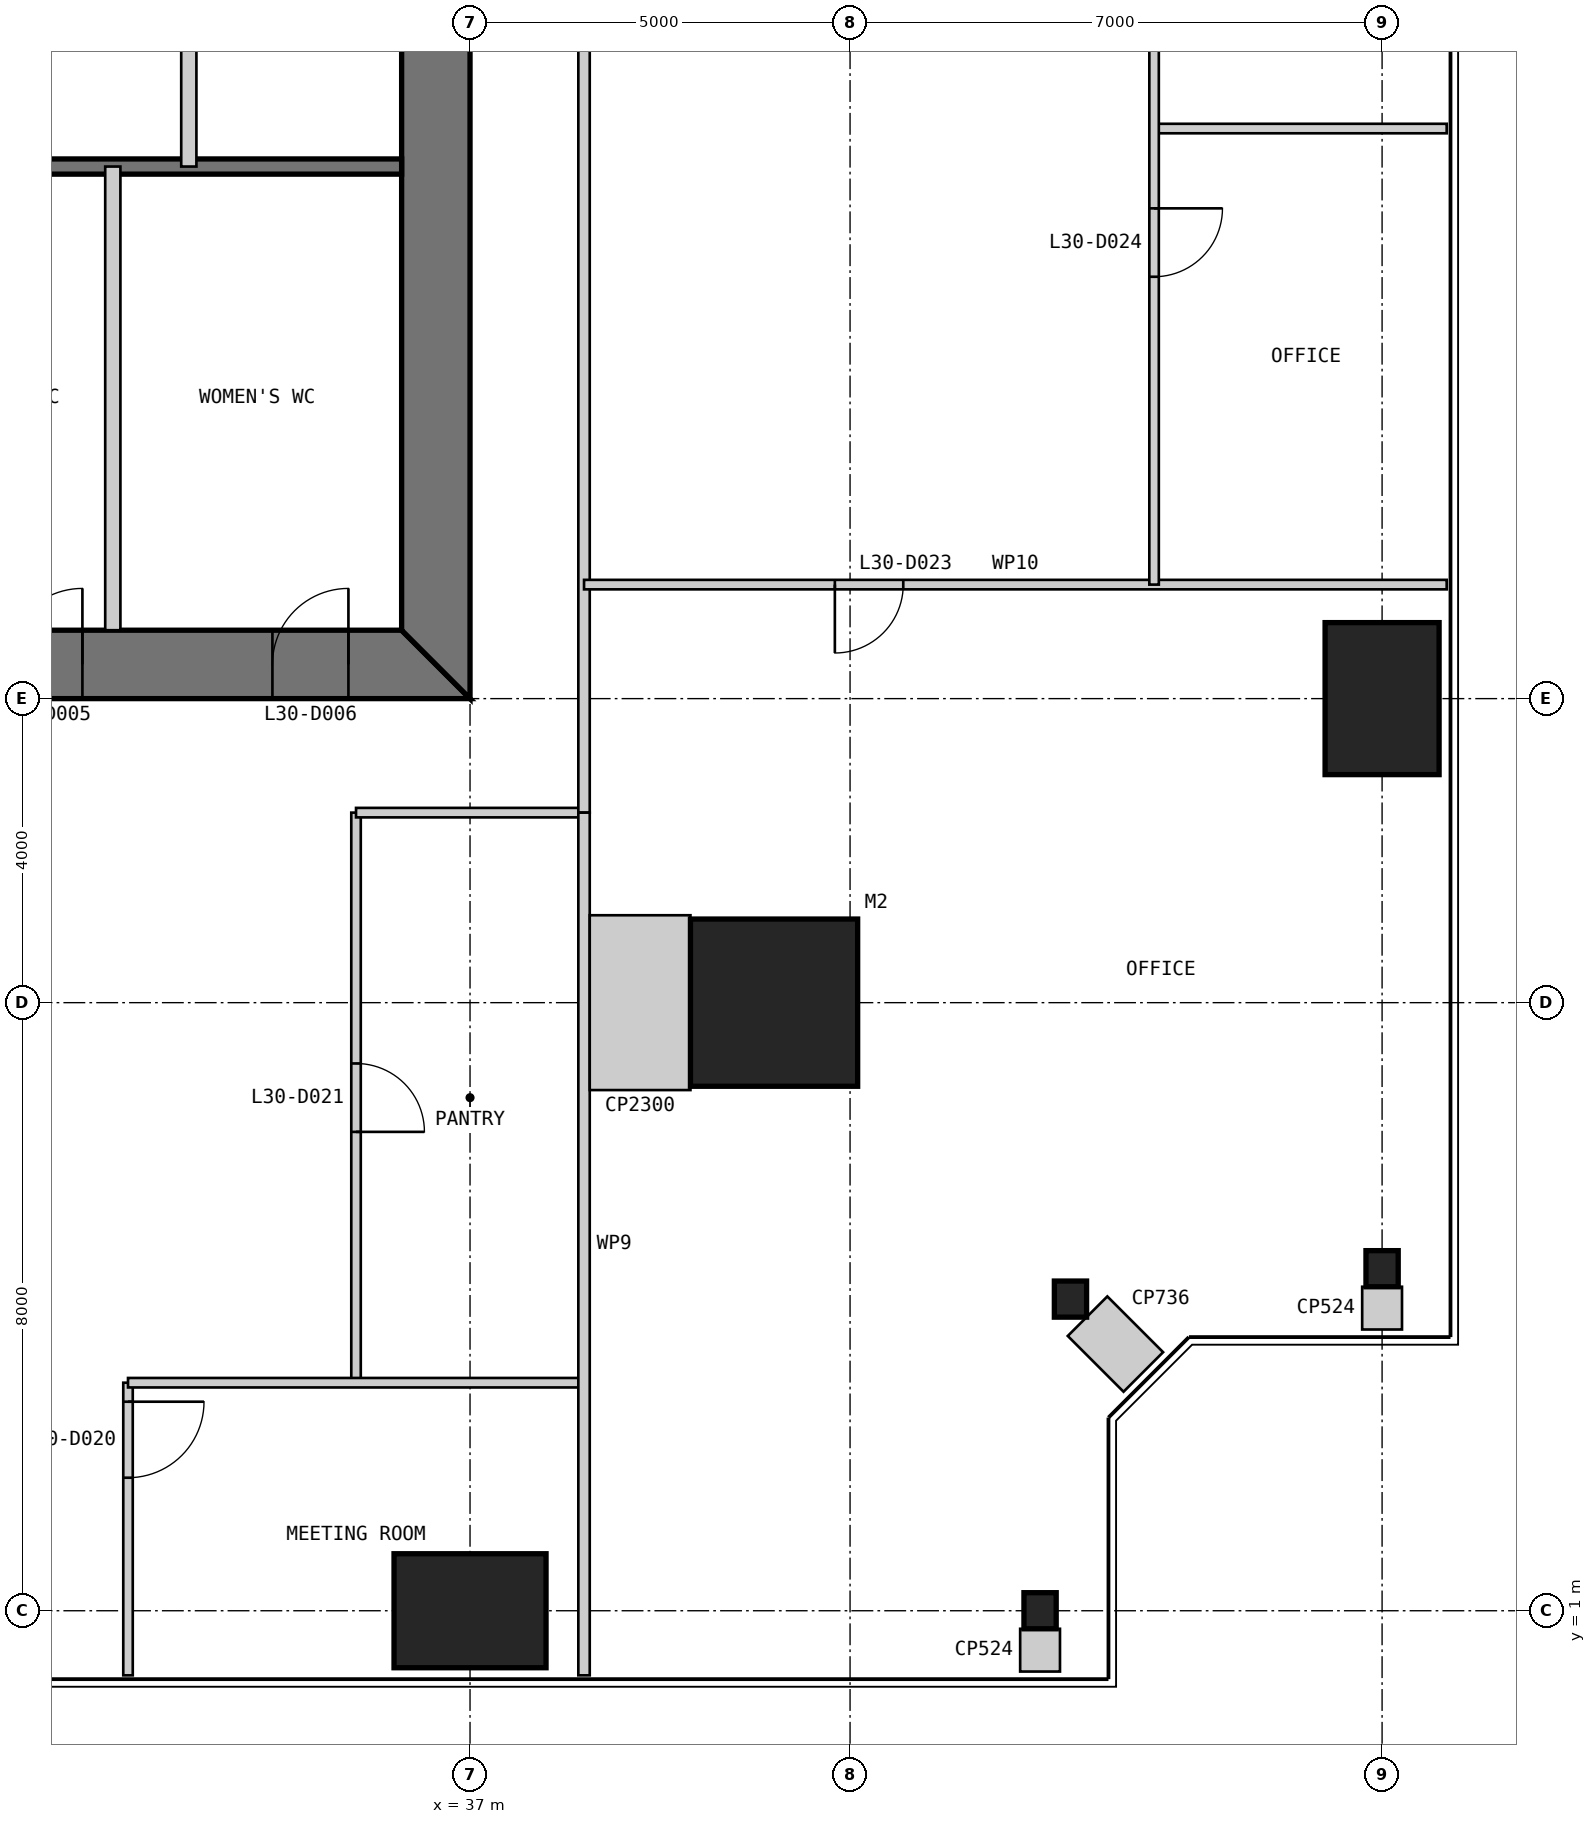
"""IFC4 building model, lengths in metres.
Left out: names, types, materials, properties, quantities, classifications, styles, units other than length and angle.
Written with IfcOpenShell. Run it as: python <this file> out.ifc"""

import sys

from ifc_helpers import new_model, si_unit, direction, frame, frame_2d, origin, origin_2d, place, context, subcontext, project, spatial, polyline, rectangle, i_section, outline, extrude, element, fill, save


model = new_model("IFC4")
c1 = context("Model", 3, precision=1e-05, world=origin(), true_north=direction((0.0, 1.0)))
c2 = subcontext(c1, "Body", "Model", "MODEL_VIEW")
j1 = project(units=[si_unit("LENGTHUNIT", "METRE"), si_unit("PLANEANGLEUNIT", "RADIAN")], contexts=[c1])
p1 = place(None, origin())
s1 = spatial("IfcSite", under=j1, at=p1, CompositionType="ELEMENT")
p2 = place(p1, origin())
s2 = spatial("IfcBuilding", under=s1, at=p2, CompositionType="ELEMENT")
p3 = place(p2, frame((0.0, 0.0, 130.4)))
s3 = spatial("IfcBuildingStorey", under=s2, at=p3, CompositionType="ELEMENT", Elevation=130.4)
p4 = place(p3, frame((41.0, 9.0, 0.0), z_axis=(0.0, 0.0, 1.0), x_axis=(1.0, 0.0, 0.0)))
e1 = element("IfcColumn", 1, at=p4, inside=s3, PredefinedType="COLUMN", context=c2, shape_type="SweptSolid", body=[
    extrude(rectangle(XDim=2.2, YDim=2.2, at=origin_2d()), origin(), (0.0, 0.0, 1.0), 4.0),
])
p5 = place(p3, frame((37.0, 1.0, 0.0), z_axis=(0.0, 0.0, 1.0), x_axis=(1.0, 0.0, 0.0)))
e2 = element("IfcColumn", 2, at=p5, inside=s3, PredefinedType="COLUMN", context=c2, shape_type="SweptSolid", body=[
    extrude(rectangle(XDim=2.0, YDim=1.5, at=origin_2d()), origin(), (0.0, 0.0, 1.0), 4.0),
])
for number, where, z_axis, x_axis in (
    (3, (44.5, 1.0, 0.0), (0.0, 0.0, 1.0), (1.0, 0.0, 0.0)),
    (4, (44.9, 5.1, 0.0), (0.0, 0.0, 1.0), (1.0, 0.0, 0.0)),
    (5, (49.0, 5.5, 0.0), (0.0, 0.0, 1.0), (1.0, 0.0, 0.0)),
):
    element("IfcColumn", number, at=place(p3, frame(where, z_axis=z_axis, x_axis=x_axis)), inside=s3, PredefinedType="COLUMN", context=c2, shape_type="SweptSolid", body=[
        extrude(i_section(OverallWidth=0.424, OverallDepth=0.475, WebThickness=0.048, FlangeThickness=0.077, at=origin_2d()), origin(), (0.0, 0.0, 1.0), 4.0),
    ])
p6 = place(p3, frame((49.0, 13.0, 0.0), z_axis=(0.0, 0.0, 1.0), x_axis=(1.0, 0.0, 0.0)))
e6 = element("IfcColumn", 6, at=p6, inside=s3, PredefinedType="COLUMN", context=c2, shape_type="SweptSolid", body=[
    extrude(rectangle(XDim=1.5, YDim=2.0, at=origin_2d()), origin(), (0.0, 0.0, 1.0), 4.0),
])
p7 = place(p3, frame((13.0, 13.45, 0.0), z_axis=(0.0, 0.0, 1.0), x_axis=(1.0, 0.0, 0.0)))
e7 = element("IfcWall", 7, at=p7, inside=s3, PredefinedType="SHEAR", context=c2, shape_type="SweptSolid", body=[
    extrude(outline(polyline([(0.0, -0.45), (24.0, -0.45), (23.1, 0.45), (0.9, 0.45), (0.0, -0.45)])), origin(), (0.0, 0.0, 1.0), 4.0),
])
p8 = place(p7, frame((4.9, 0.0, 0.0)))
e8 = element("IfcOpeningElement", 8, at=p8, cuts=e7, PredefinedType="OPENING", context=c2, shape_type="SweptSolid", body=[
    extrude(rectangle(XDim=1.0, YDim=2.2, at=frame_2d((0.5, 1.1))), frame((0.0, 0.46, 0.0), z_axis=(0.0, -1.0, 0.0), x_axis=(1.0, 0.0, 0.0)), (0.0, 0.0, 1.0), 0.92),
])
p9 = place(p7, frame((8.9, 0.0, 0.0)))
e9 = element("IfcOpeningElement", 9, at=p9, cuts=e7, PredefinedType="OPENING", context=c2, shape_type="SweptSolid", body=[
    extrude(rectangle(XDim=1.1, YDim=2.2, at=frame_2d((0.55, 1.1))), frame((0.0, 0.46, 0.0), z_axis=(0.0, -1.0, 0.0), x_axis=(1.0, 0.0, 0.0)), (0.0, 0.0, 1.0), 0.92),
])
p10 = place(p7, frame((15.05, 0.0, 0.0)))
e10 = element("IfcOpeningElement", 10, at=p10, cuts=e7, PredefinedType="OPENING", context=c2, shape_type="SweptSolid", body=[
    extrude(rectangle(XDim=0.9, YDim=2.2, at=frame_2d((0.45, 1.1))), frame((0.0, 0.46, 0.0), z_axis=(0.0, -1.0, 0.0), x_axis=(1.0, 0.0, 0.0)), (0.0, 0.0, 1.0), 0.92),
])
p11 = place(p7, frame((17.9, 0.0, 0.0)))
e11 = element("IfcOpeningElement", 11, at=p11, cuts=e7, PredefinedType="OPENING", context=c2, shape_type="SweptSolid", body=[
    extrude(rectangle(XDim=1.0, YDim=2.2, at=frame_2d((0.5, 1.1))), frame((0.0, 0.46, 0.0), z_axis=(0.0, -1.0, 0.0), x_axis=(1.0, 0.0, 0.0)), (0.0, 0.0, 1.0), 0.92),
])
p12 = place(p7, frame((21.4, 0.0, 0.0)))
e12 = element("IfcOpeningElement", 12, at=p12, cuts=e7, PredefinedType="OPENING", context=c2, shape_type="SweptSolid", body=[
    extrude(rectangle(XDim=1.0, YDim=2.2, at=frame_2d((0.5, 1.1))), frame((0.0, 0.46, 0.0), z_axis=(0.0, -1.0, 0.0), x_axis=(1.0, 0.0, 0.0)), (0.0, 0.0, 1.0), 0.92),
])
p13 = place(p3, frame((36.55, 13.9, 0.0), z_axis=(0.0, 0.0, 1.0), x_axis=(0.0, 1.0, 0.0)))
e13 = element("IfcWall", 13, at=p13, inside=s3, PredefinedType="SHEAR", context=c2, shape_type="SweptSolid", body=[
    extrude(outline(polyline([(-0.9, -0.45), (23.1, -0.45), (22.2, 0.45), (0.0, 0.45), (-0.9, -0.45)])), origin(), (0.0, 0.0, 1.0), 4.0),
])
p14 = place(p13, frame((20.2, 0.0, 0.0)))
e14 = element("IfcOpeningElement", 14, at=p14, cuts=e13, PredefinedType="OPENING", context=c2, shape_type="SweptSolid", body=[
    extrude(rectangle(XDim=1.0, YDim=2.2, at=frame_2d((0.5, 1.1))), frame((0.0, 0.46, 0.0), z_axis=(0.0, -1.0, 0.0), x_axis=(1.0, 0.0, 0.0)), (0.0, 0.0, 1.0), 0.92),
])
p15 = place(p13, frame((17.25, 0.0, 0.0)))
e15 = element("IfcOpeningElement", 15, at=p15, cuts=e13, PredefinedType="OPENING", context=c2, shape_type="SweptSolid", body=[
    extrude(rectangle(XDim=0.9, YDim=2.2, at=frame_2d((0.45, 1.1))), frame((0.0, 0.46, 0.0), z_axis=(0.0, -1.0, 0.0), x_axis=(1.0, 0.0, 0.0)), (0.0, 0.0, 1.0), 0.92),
])
p16 = place(p3, frame((20.3, 20.0, 0.0), z_axis=(0.0, 0.0, 1.0), x_axis=(1.0, 0.0, 0.0)))
e16 = element("IfcWall", 16, at=p16, inside=s3, PredefinedType="SOLIDWALL", context=c2, shape_type="SweptSolid", body=[
    extrude(rectangle(XDim=15.8, YDim=0.2, at=frame_2d((7.9, 0.0))), origin(), (0.0, 0.0, 1.0), 3.8),
])
p17 = place(p3, frame((32.3, 13.9, 0.0), z_axis=(0.0, 0.0, 1.0), x_axis=(0.0, 1.0, 0.0)))
e17 = element("IfcWall", 17, at=p17, inside=s3, PredefinedType="PARTITIONING", context=c2, shape_type="SweptSolid", body=[
    extrude(rectangle(XDim=6.1, YDim=0.2, at=frame_2d((3.05, 0.0))), origin(), (0.0, 0.0, 1.0), 3.8),
])
p18 = place(p3, frame((33.3, 36.1, 0.0), z_axis=(0.0, 0.0, 1.0), x_axis=(0.0, -1.0, 0.0)))
e18 = element("IfcWall", 18, at=p18, inside=s3, PredefinedType="PARTITIONING", context=c2, shape_type="SweptSolid", body=[
    extrude(rectangle(XDim=16.1, YDim=0.2, at=frame_2d((8.05, 0.0))), origin(), (0.0, 0.0, 1.0), 3.8),
])
p19 = place(p18, frame((3.8, 0.0, 0.0)))
e19 = element("IfcOpeningElement", 19, at=p19, cuts=e18, PredefinedType="OPENING", context=c2, shape_type="SweptSolid", body=[
    extrude(rectangle(XDim=0.9, YDim=2.2, at=frame_2d((0.45, 1.1))), frame((0.0, 0.11, 0.0), z_axis=(0.0, -1.0, 0.0), x_axis=(1.0, 0.0, 0.0)), (0.0, 0.0, 1.0), 0.22),
])
p20 = place(p3, frame((32.5, 0.15, 0.0), z_axis=(0.0, 0.0, 1.0), x_axis=(0.0, 1.0, 0.0)))
e20 = element("IfcWall", 20, at=p20, inside=s3, PredefinedType="PARTITIONING", context=c2, shape_type="SweptSolid", body=[
    extrude(rectangle(XDim=3.85, YDim=0.125, at=frame_2d((1.925, 0.0))), origin(), (0.0, 0.0, 1.0), 3.85),
])
p21 = place(p20, frame((2.6, 0.0, 0.0)))
e21 = element("IfcOpeningElement", 21, at=p21, cuts=e20, PredefinedType="OPENING", context=c2, shape_type="SweptSolid", body=[
    extrude(rectangle(XDim=1.0, YDim=2.2, at=frame_2d((0.5, 1.1))), frame((0.0, 0.073, 0.0), z_axis=(0.0, -1.0, 0.0), x_axis=(1.0, 0.0, 0.0)), (0.0, 0.0, 1.0), 0.145),
])
p22 = place(p3, frame((35.5, 4.0, 0.0), z_axis=(0.0, 0.0, 1.0), x_axis=(0.0, 1.0, 0.0)))
e22 = element("IfcWall", 22, at=p22, inside=s3, PredefinedType="PARTITIONING", context=c2, shape_type="SweptSolid", body=[
    extrude(rectangle(XDim=7.5, YDim=0.125, at=frame_2d((3.75, 0.0))), origin(), (0.0, 0.0, 1.0), 3.85),
])
p23 = place(p22, frame((3.3, 0.0, 0.0)))
e23 = element("IfcOpeningElement", 23, at=p23, cuts=e22, PredefinedType="OPENING", context=c2, shape_type="SweptSolid", body=[
    extrude(rectangle(XDim=0.9, YDim=2.2, at=frame_2d((0.45, 1.1))), frame((0.0, 0.073, 0.0), z_axis=(0.0, -1.0, 0.0), x_axis=(1.0, 0.0, 0.0)), (0.0, 0.0, 1.0), 0.145),
])
p24 = place(p3, frame((32.5, 4.0, 0.0), z_axis=(0.0, 0.0, 1.0), x_axis=(1.0, 0.0, 0.0)))
e24 = element("IfcWall", 24, at=p24, inside=s3, PredefinedType="PARTITIONING", context=c2, shape_type="SweptSolid", body=[
    extrude(rectangle(XDim=6.0, YDim=0.125, at=frame_2d((3.0, 0.0))), origin(), (0.0, 0.0, 1.0), 3.85),
])
p25 = place(p3, frame((35.5, 11.5, 0.0), z_axis=(0.0, 0.0, 1.0), x_axis=(1.0, 0.0, 0.0)))
e25 = element("IfcWall", 25, at=p25, inside=s3, PredefinedType="PARTITIONING", context=c2, shape_type="SweptSolid", body=[
    extrude(rectangle(XDim=3.0, YDim=0.125, at=frame_2d((1.5, 0.0))), origin(), (0.0, 0.0, 1.0), 3.85),
])
p26 = place(p3, frame((38.5, 11.5, 0.0), z_axis=(0.0, 0.0, 1.0), x_axis=(0.0, 1.0, 0.0)))
e26 = element("IfcWall", 26, at=p26, inside=s3, PredefinedType="PARTITIONING", context=c2, shape_type="SweptSolid", body=[
    extrude(rectangle(XDim=27.0, YDim=0.15, at=frame_2d((13.5, 0.0))), origin(), (0.0, 0.0, 1.0), 3.85),
])
p27 = place(p26, frame((13.0, 0.0, 0.0)))
e27 = element("IfcOpeningElement", 27, at=p27, cuts=e26, PredefinedType="OPENING", context=c2, shape_type="SweptSolid", body=[
    extrude(rectangle(XDim=1.0, YDim=2.2, at=frame_2d((0.5, 1.1))), frame((0.0, 0.085, 0.0), z_axis=(0.0, -1.0, 0.0), x_axis=(1.0, 0.0, 0.0)), (0.0, 0.0, 1.0), 0.17),
])
p28 = place(p3, frame((38.5, 0.15, 0.0), z_axis=(0.0, 0.0, 1.0), x_axis=(0.0, 1.0, 0.0)))
e28 = element("IfcWall", 28, at=p28, inside=s3, PredefinedType="PARTITIONING", context=c2, shape_type="SweptSolid", body=[
    extrude(rectangle(XDim=11.35, YDim=0.15, at=frame_2d((5.675, 0.0))), origin(), (0.0, 0.0, 1.0), 3.85),
])
p29 = place(p3, frame((49.85, 14.5, 0.0), z_axis=(0.0, 0.0, 1.0), x_axis=(-1.0, 0.0, 0.0)))
e29 = element("IfcWall", 29, at=p29, inside=s3, PredefinedType="PARTITIONING", context=c2, shape_type="SweptSolid", body=[
    extrude(rectangle(XDim=11.35, YDim=0.125, at=frame_2d((5.675, 0.0))), origin(), (0.0, 0.0, 1.0), 3.85),
])
p30 = place(p29, frame((7.15, 0.0, 0.0)))
e30 = element("IfcOpeningElement", 30, at=p30, cuts=e29, PredefinedType="OPENING", context=c2, shape_type="SweptSolid", body=[
    extrude(rectangle(XDim=0.9, YDim=2.2, at=frame_2d((0.45, 1.1))), frame((0.0, 0.073, 0.0), z_axis=(0.0, -1.0, 0.0), x_axis=(1.0, 0.0, 0.0)), (0.0, 0.0, 1.0), 0.145),
])
p31 = place(p3, frame((49.85, 20.5, 0.0), z_axis=(0.0, 0.0, 1.0), x_axis=(-1.0, 0.0, 0.0)))
e31 = element("IfcWall", 31, at=p31, inside=s3, PredefinedType="PARTITIONING", context=c2, shape_type="SweptSolid", body=[
    extrude(rectangle(XDim=3.85, YDim=0.125, at=frame_2d((1.925, 0.0))), origin(), (0.0, 0.0, 1.0), 3.85),
])
p32 = place(p3, frame((46.0, 14.5, 0.0), z_axis=(0.0, 0.0, 1.0), x_axis=(0.0, 1.0, 0.0)))
e32 = element("IfcWall", 32, at=p32, inside=s3, PredefinedType="PARTITIONING", context=c2, shape_type="SweptSolid", body=[
    extrude(rectangle(XDim=24.0, YDim=0.125, at=frame_2d((12.0, 0.0))), origin(), (0.0, 0.0, 1.0), 3.238),
])
p33 = place(p32, frame((4.05, 0.0, 0.0)))
e33 = element("IfcOpeningElement", 33, at=p33, cuts=e32, PredefinedType="OPENING", context=c2, shape_type="SweptSolid", body=[
    extrude(rectangle(XDim=0.9, YDim=2.2, at=frame_2d((0.45, 1.1))), frame((0.0, 0.073, 0.0), z_axis=(0.0, -1.0, 0.0), x_axis=(1.0, 0.0, 0.0)), (0.0, 0.0, 1.0), 0.145),
])
p34 = place(p32, frame((10.05, 0.0, 0.0)))
e34 = element("IfcOpeningElement", 34, at=p34, cuts=e32, PredefinedType="OPENING", context=c2, shape_type="SweptSolid", body=[
    extrude(rectangle(XDim=0.9, YDim=2.2, at=frame_2d((0.45, 1.1))), frame((0.0, 0.073, 0.0), z_axis=(0.0, -1.0, 0.0), x_axis=(1.0, 0.0, 0.0)), (0.0, 0.0, 1.0), 0.145),
])
p35 = place(p32, frame((16.05, 0.0, 0.0)))
e35 = element("IfcOpeningElement", 35, at=p35, cuts=e32, PredefinedType="OPENING", context=c2, shape_type="SweptSolid", body=[
    extrude(rectangle(XDim=0.9, YDim=2.2, at=frame_2d((0.45, 1.1))), frame((0.0, 0.073, 0.0), z_axis=(0.0, -1.0, 0.0), x_axis=(1.0, 0.0, 0.0)), (0.0, 0.0, 1.0), 0.145),
])
p36 = place(p32, frame((19.05, 0.0, 0.0)))
e36 = element("IfcOpeningElement", 36, at=p36, cuts=e32, PredefinedType="OPENING", context=c2, shape_type="SweptSolid", body=[
    extrude(rectangle(XDim=0.9, YDim=2.2, at=frame_2d((0.45, 1.1))), frame((0.0, 0.073, 0.0), z_axis=(0.0, -1.0, 0.0), x_axis=(1.0, 0.0, 0.0)), (0.0, 0.0, 1.0), 0.145),
])
p37 = place(p3, frame((38.575, 9.0, 0.0), z_axis=(0.0, 0.0, 1.0), x_axis=(1.0, 0.0, 0.0)))
e37 = element("IfcWall", 37, at=p37, inside=s3, PredefinedType="PARTITIONING", context=c2, shape_type="SweptSolid", body=[
    extrude(rectangle(XDim=1.325, YDim=2.3, at=frame_2d((0.663, 0.0))), origin(), (0.0, 0.0, 1.0), 3.85),
])
p38 = place(p3, frame((44.5, 0.2, 0.0), z_axis=(0.0, 0.0, 1.0), x_axis=(0.0, 1.0, 0.0)))
e38 = element("IfcWall", 38, at=p38, inside=s3, PredefinedType="PARTITIONING", context=c2, shape_type="SweptSolid", body=[
    extrude(rectangle(XDim=0.562, YDim=0.524, at=frame_2d((0.281, 0.0))), origin(), (0.0, 0.0, 1.0), 3.85),
])
p39 = place(p3, frame((45.859, 4.141, 0.0), z_axis=(0.0, 0.0, 1.0), x_axis=(-0.707106781187, 0.707106781187, 0.0)))
e39 = element("IfcWall", 39, at=p39, inside=s3, PredefinedType="PARTITIONING", context=c2, shape_type="SweptSolid", body=[
    extrude(rectangle(XDim=1.038, YDim=0.736, at=frame_2d((0.519, 0.0))), origin(), (0.0, 0.0, 1.0), 3.85),
])
p40 = place(p3, frame((49.0, 4.7, 0.0), z_axis=(0.0, 0.0, 1.0), x_axis=(0.0, 1.0, 0.0)))
e40 = element("IfcWall", 40, at=p40, inside=s3, PredefinedType="PARTITIONING", context=c2, shape_type="SweptSolid", body=[
    extrude(rectangle(XDim=0.562, YDim=0.524, at=frame_2d((0.281, 0.0))), origin(), (0.0, 0.0, 1.0), 3.85),
])
p41 = place(p11, origin())
e41 = element("IfcDoor", 41, at=p41, inside=s3, OperationType="SINGLE_SWING_RIGHT", PredefinedType="DOOR", context=c2, shape_type="SweptSolid", body=[
    extrude(rectangle(XDim=1.0, YDim=2.2, at=frame_2d((0.5, 1.1))), frame((0.0, 0.025, 0.0), z_axis=(0.0, -1.0, 0.0), x_axis=(1.0, 0.0, 0.0)), (0.0, 0.0, 1.0), 0.05),
    extrude(outline(polyline([(0.0, 0.0), (0.04, 0.0), (0.04, 2.16), (0.96, 2.16), (0.96, 0.0), (1.0, 0.0), (1.0, 2.2), (0.0, 2.2), (0.0, 0.0)])), frame((0.0, 0.3, 0.0), z_axis=(0.0, -1.0, 0.0), x_axis=(1.0, 0.0, 0.0)), (0.0, 0.0, 1.0), 0.6),
])
fill(e11, e41)
p42 = place(p12, origin())
e42 = element("IfcDoor", 42, at=p42, inside=s3, OperationType="SINGLE_SWING_RIGHT", PredefinedType="DOOR", context=c2, shape_type="SweptSolid", body=[
    extrude(rectangle(XDim=1.0, YDim=2.2, at=frame_2d((0.5, 1.1))), frame((0.0, 0.025, 0.0), z_axis=(0.0, -1.0, 0.0), x_axis=(1.0, 0.0, 0.0)), (0.0, 0.0, 1.0), 0.05),
    extrude(outline(polyline([(0.0, 0.0), (0.04, 0.0), (0.04, 2.16), (0.96, 2.16), (0.96, 0.0), (1.0, 0.0), (1.0, 2.2), (0.0, 2.2), (0.0, 0.0)])), frame((0.0, 0.3, 0.0), z_axis=(0.0, -1.0, 0.0), x_axis=(1.0, 0.0, 0.0)), (0.0, 0.0, 1.0), 0.6),
])
fill(e12, e42)
p43 = place(p21, frame((1.0, 0.0, 0.0), z_axis=(0.0, 0.0, 1.0), x_axis=(-1.0, 0.0, 0.0)))
e43 = element("IfcDoor", 43, at=p43, inside=s3, OperationType="SINGLE_SWING_LEFT", PredefinedType="DOOR", context=c2, shape_type="SweptSolid", body=[
    extrude(rectangle(XDim=1.0, YDim=2.2, at=frame_2d((0.5, 1.1))), frame((0.0, 0.025, 0.0), z_axis=(0.0, -1.0, 0.0), x_axis=(1.0, 0.0, 0.0)), (0.0, 0.0, 1.0), 0.05),
])
fill(e21, e43)
p44 = place(p23, frame((0.9, 0.0, 0.0), z_axis=(0.0, 0.0, 1.0), x_axis=(-1.0, 0.0, 0.0)))
e44 = element("IfcDoor", 44, at=p44, inside=s3, OperationType="SINGLE_SWING_RIGHT", PredefinedType="DOOR", context=c2, shape_type="SweptSolid", body=[
    extrude(rectangle(XDim=0.9, YDim=2.2, at=frame_2d((0.45, 1.1))), frame((0.0, 0.025, 0.0), z_axis=(0.0, -1.0, 0.0), x_axis=(1.0, 0.0, 0.0)), (0.0, 0.0, 1.0), 0.05),
])
fill(e23, e44)
p45 = place(p30, origin())
e45 = element("IfcDoor", 45, at=p45, inside=s3, OperationType="SINGLE_SWING_RIGHT", PredefinedType="DOOR", context=c2, shape_type="SweptSolid", body=[
    extrude(rectangle(XDim=0.9, YDim=2.2, at=frame_2d((0.45, 1.1))), frame((0.0, 0.025, 0.0), z_axis=(0.0, -1.0, 0.0), x_axis=(1.0, 0.0, 0.0)), (0.0, 0.0, 1.0), 0.05),
])
fill(e30, e45)
p46 = place(p33, frame((0.9, 0.0, 0.0), z_axis=(0.0, 0.0, 1.0), x_axis=(-1.0, 0.0, 0.0)))
e46 = element("IfcDoor", 46, at=p46, inside=s3, OperationType="SINGLE_SWING_LEFT", PredefinedType="DOOR", context=c2, shape_type="SweptSolid", body=[
    extrude(rectangle(XDim=0.9, YDim=2.2, at=frame_2d((0.45, 1.1))), frame((0.0, 0.025, 0.0), z_axis=(0.0, -1.0, 0.0), x_axis=(1.0, 0.0, 0.0)), (0.0, 0.0, 1.0), 0.05),
])
fill(e33, e46)
save(model, sys.argv[1])
